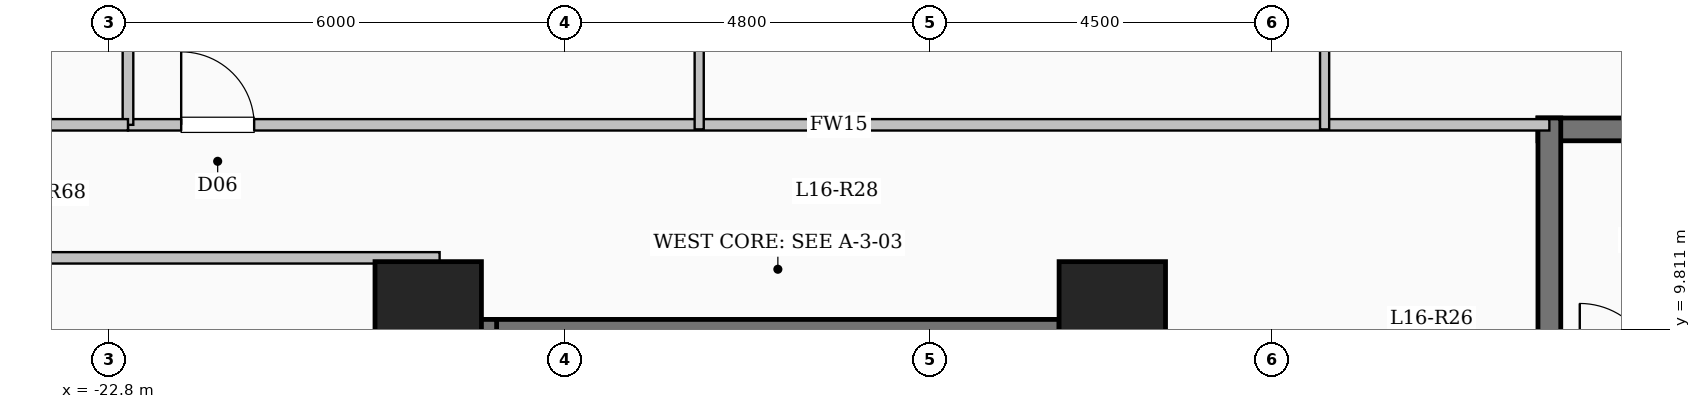
"""IFC4 building model, lengths in metres.
Left out: names, types, materials, properties, quantities, classifications, styles, units other than length and angle.
Written with IfcOpenShell. Run it as: python <this file> out.ifc"""

import sys

from ifc_helpers import new_model, si_unit, direction, frame, frame_2d, origin, origin_2d, place, context, subcontext, project, spatial, rectangle, extrude, element, fill, save


model = new_model("IFC4")
c1 = context("Model", 3, precision=1e-05, world=origin(), true_north=direction((0.0, 1.0)))
c2 = subcontext(c1, "Body", "Model", "MODEL_VIEW")
j1 = project(units=[si_unit("LENGTHUNIT", "METRE"), si_unit("PLANEANGLEUNIT", "RADIAN")], contexts=[c1])
p1 = place(None, origin())
s1 = spatial("IfcSite", under=j1, at=p1, CompositionType="ELEMENT")
p2 = place(p1, origin())
s2 = spatial("IfcBuilding", under=s1, at=p2, CompositionType="ELEMENT")
p3 = place(p2, frame((0.0, 0.0, 60.85)))
s3 = spatial("IfcBuildingStorey", under=s2, at=p3, CompositionType="ELEMENT", Elevation=60.85)
for number, where, z_axis, x_axis in (
    (1, (-9.6, 10.0, 0.0), (0.0, 0.0, 1.0), (1.0, 0.0, 0.0)),
    (2, (-18.6, 10.0, 0.0), (0.0, 0.0, 1.0), (1.0, 0.0, 0.0)),
):
    element("IfcColumn", number, at=place(p3, frame(where, z_axis=z_axis, x_axis=x_axis)), inside=s3, PredefinedType="COLUMN", context=c2, shape_type="SweptSolid", body=[
        extrude(rectangle(XDim=1.4, YDim=1.4, at=origin_2d()), origin(), (0.0, 0.0, 1.0), 3.35),
    ])
p4 = place(p3, frame((-18.0, 9.79, 0.0), z_axis=(0.0, 0.0, 1.0), x_axis=(1.0, 0.0, 0.0)))
e3 = element("IfcWall", 3, at=p4, inside=s3, PredefinedType="SHEAR", context=c2, shape_type="SweptSolid", body=[
    extrude(rectangle(XDim=8.0, YDim=0.3, at=frame_2d((4.0, 0.0))), origin(), (0.0, 0.0, 1.0), 3.35),
])
for number, where, z_axis, x_axis in (
    (4, (-17.85, 6.35, 0.0), (0.0, 0.0, 1.0), (0.0, 1.0, 0.0)),
    (5, (-10.15, 6.35, 0.0), (0.0, 0.0, 1.0), (0.0, 1.0, 0.0)),
):
    element("IfcWall", number, at=place(p3, frame(where, z_axis=z_axis, x_axis=x_axis)), inside=s3, PredefinedType="SHEAR", context=c2, shape_type="SweptSolid", body=[
        extrude(rectangle(XDim=3.59, YDim=0.3, at=frame_2d((1.795, 0.0))), origin(), (0.0, 0.0, 1.0), 3.35),
    ])
p5 = place(p3, frame((-4.0, 12.44, 0.0), z_axis=(0.0, 0.0, 1.0), x_axis=(1.0, 0.0, 0.0)))
e6 = element("IfcWall", 6, at=p5, inside=s3, PredefinedType="SHEAR", context=c2, shape_type="SweptSolid", body=[
    extrude(rectangle(XDim=8.0, YDim=0.3, at=frame_2d((4.0, 0.0))), origin(), (0.0, 0.0, 1.0), 3.35),
])
p6 = place(p3, frame((-3.85, 9.0, 0.0), z_axis=(0.0, 0.0, 1.0), x_axis=(0.0, 1.0, 0.0)))
e7 = element("IfcWall", 7, at=p6, inside=s3, PredefinedType="SHEAR", context=c2, shape_type="SweptSolid", body=[
    extrude(rectangle(XDim=3.59, YDim=0.3, at=frame_2d((1.795, 0.0))), origin(), (0.0, 0.0, 1.0), 3.35),
])
p7 = place(p3, frame((-22.55, 12.5, 0.0), z_axis=(0.0, 0.0, 1.0), x_axis=(1.0, 0.0, 0.0)))
e8 = element("IfcWall", 8, at=p7, inside=s3, PredefinedType="PARTITIONING", context=c2, shape_type="SweptSolid", body=[
    extrude(rectangle(XDim=18.7, YDim=0.15, at=frame_2d((9.35, 0.0))), origin(), (0.0, 0.0, 1.0), 3.05),
])
p8 = place(p7, frame((0.7, 0.0, 0.0)))
e9 = element("IfcOpeningElement", 9, at=p8, cuts=e8, PredefinedType="OPENING", context=c2, shape_type="SweptSolid", body=[
    extrude(rectangle(XDim=0.96, YDim=2.15, at=frame_2d((0.48, 1.075))), frame((0.0, 0.085, 0.0), z_axis=(0.0, -1.0, 0.0), x_axis=(1.0, 0.0, 0.0)), (0.0, 0.0, 1.0), 0.17),
])
p9 = place(p3, frame((-15.035, 12.44, 0.0), z_axis=(0.0, 0.0, 1.0), x_axis=(0.0, 1.0, 0.0)))
e10 = element("IfcWall", 10, at=p9, inside=s3, PredefinedType="PARTITIONING", context=c2, shape_type="SweptSolid", body=[
    extrude(rectangle(XDim=11.16, YDim=0.12, at=frame_2d((5.58, 0.0))), origin(), (0.0, 0.0, 1.0), 2.385),
])
p10 = place(p9, frame((2.905, 0.0, 0.0)))
e11 = element("IfcOpeningElement", 11, at=p10, cuts=e10, PredefinedType="OPENING", context=c2, shape_type="SweptSolid", body=[
    extrude(rectangle(XDim=1.08, YDim=2.15, at=frame_2d((0.54, 1.075))), frame((0.0, 0.07, 0.0), z_axis=(0.0, -1.0, 0.0), x_axis=(1.0, 0.0, 0.0)), (0.0, 0.0, 1.0), 0.14),
])
p11 = place(p3, frame((-6.807, 12.44, 0.0), z_axis=(0.0, 0.0, 1.0), x_axis=(0.0, 1.0, 0.0)))
e12 = element("IfcWall", 12, at=p11, inside=s3, PredefinedType="PARTITIONING", context=c2, shape_type="SweptSolid", body=[
    extrude(rectangle(XDim=2.62, YDim=0.12, at=frame_2d((1.31, 0.0))), origin(), (0.0, 0.0, 1.0), 3.05),
])
p12 = place(p3, frame((-28.68, 10.75, 0.0), z_axis=(0.0, 0.0, 1.0), x_axis=(1.0, 0.0, 0.0)))
e13 = element("IfcWall", 13, at=p12, inside=s3, PredefinedType="PARTITIONING", context=c2, shape_type="SweptSolid", body=[
    extrude(rectangle(XDim=10.23, YDim=0.15, at=frame_2d((5.115, 0.0))), origin(), (0.0, 0.0, 1.0), 3.05),
])
p13 = place(p3, frame((-22.55, 12.5, 0.0), z_axis=(0.0, 0.0, 1.0), x_axis=(0.0, 1.0, 0.0)))
e14 = element("IfcWall", 14, at=p13, inside=s3, PredefinedType="PARTITIONING", context=c2, shape_type="SweptSolid", body=[
    extrude(rectangle(XDim=6.55, YDim=0.14, at=frame_2d((3.275, 0.0))), origin(), (0.0, 0.0, 1.0), 3.05),
])
p14 = place(p3, frame((-28.68, 12.5, 0.0), z_axis=(0.0, 0.0, 1.0), x_axis=(1.0, 0.0, 0.0)))
e15 = element("IfcWall", 15, at=p14, inside=s3, PredefinedType="PARTITIONING", context=c2, shape_type="SweptSolid", body=[
    extrude(rectangle(XDim=6.13, YDim=0.15, at=frame_2d((3.065, 0.0))), origin(), (0.0, 0.0, 1.0), 3.05),
])
p15 = place(p14, frame((2.59, 0.0, 0.0)))
e16 = element("IfcOpeningElement", 16, at=p15, cuts=e15, PredefinedType="OPENING", context=c2, shape_type="SweptSolid", body=[
    extrude(rectangle(XDim=0.95, YDim=2.15, at=frame_2d((0.475, 1.075))), frame((0.0, 0.085, 0.0), z_axis=(0.0, -1.0, 0.0), x_axis=(1.0, 0.0, 0.0)), (0.0, 0.0, 1.0), 0.17),
])
p16 = place(p8, origin())
e17 = element("IfcDoor", 17, at=p16, inside=s3, OperationType="SINGLE_SWING_LEFT", PredefinedType="DOOR", context=c2, shape_type="SweptSolid", body=[
    extrude(rectangle(XDim=0.96, YDim=2.15, at=frame_2d((0.48, 1.075))), frame((0.0, 0.025, 0.0), z_axis=(0.0, -1.0, 0.0), x_axis=(1.0, 0.0, 0.0)), (0.0, 0.0, 1.0), 0.05),
])
fill(e9, e17)
save(model, sys.argv[1])
